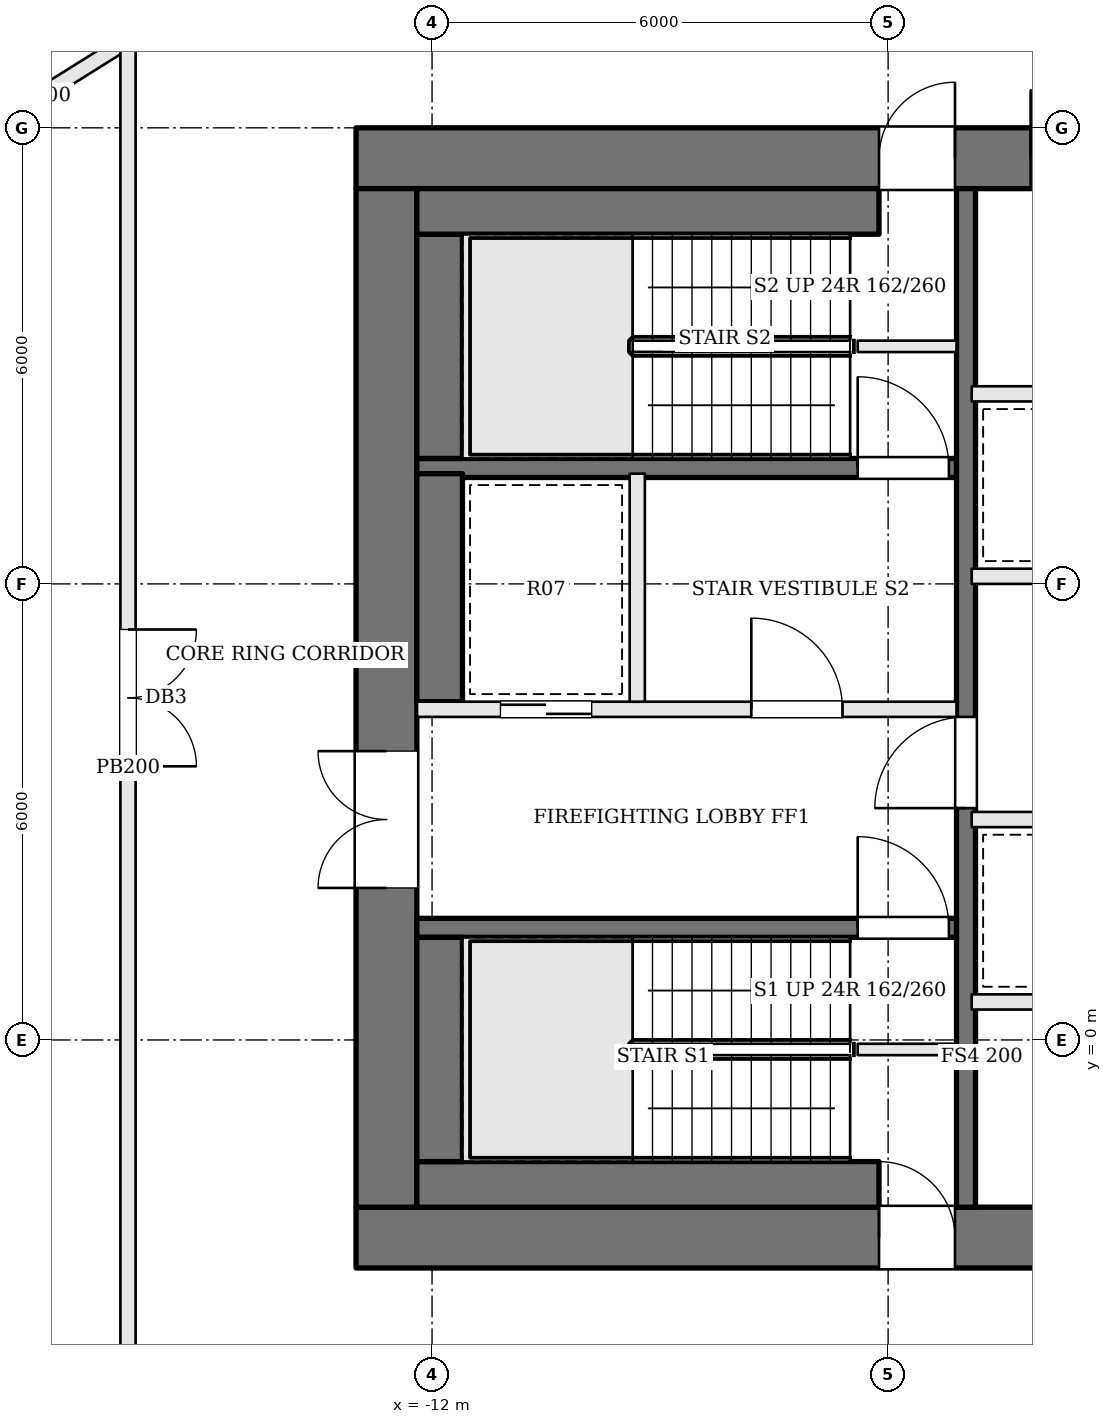
"""IFC4 building model, lengths in metres.
Left out: names, types, materials, properties, quantities, classifications, styles, units other than length and angle.
Written with IfcOpenShell. Run it as: python <this file> out.ifc"""

import sys

from ifc_helpers import new_model, si_unit, direction, frame, frame_2d, origin, place, context, subcontext, project, spatial, rectangle, extrude, element, fill, save


model = new_model("IFC4")
c1 = context("Model", 3, precision=1e-05, world=origin(), true_north=direction((0.0, 1.0)))
c2 = subcontext(c1, "Body", "Model", "MODEL_VIEW")
j1 = project(units=[si_unit("LENGTHUNIT", "METRE"), si_unit("PLANEANGLEUNIT", "RADIAN")], contexts=[c1])
p1 = place(None, origin())
s1 = spatial("IfcSite", under=j1, at=p1, CompositionType="ELEMENT")
p2 = place(p1, origin())
s2 = spatial("IfcBuilding", under=s1, at=p2, CompositionType="ELEMENT")
p3 = place(p2, frame((0.0, 0.0, 240.9)))
s3 = spatial("IfcBuildingStorey", under=s2, at=p3, CompositionType="ELEMENT", Elevation=240.9)
p4 = place(p3, frame((-13.0, 11.6, 0.0), z_axis=(0.0, 0.0, 1.0), x_axis=(1.0, 0.0, 0.0)))
e1 = element("IfcWall", 1, at=p4, inside=s3, PredefinedType="SHEAR", context=c2, shape_type="SweptSolid", body=[
    extrude(rectangle(XDim=26.0, YDim=0.8, at=frame_2d((13.0, 0.0))), origin(), (0.0, 0.0, 1.0), 3.9),
])
p5 = place(p4, frame((8.875, 0.0, 0.0)))
e2 = element("IfcOpeningElement", 2, at=p5, cuts=e1, PredefinedType="OPENING", context=c2, shape_type="SweptSolid", body=[
    extrude(rectangle(XDim=0.9, YDim=2.1, at=frame_2d((0.45, 1.05))), frame((0.0, 0.41, 0.0), z_axis=(0.0, -1.0, 0.0), x_axis=(1.0, 0.0, 0.0)), (0.0, 0.0, 1.0), 0.82),
])
p6 = place(p4, frame((11.425, 0.0, 0.0)))
e3 = element("IfcOpeningElement", 3, at=p6, cuts=e1, PredefinedType="OPENING", context=c2, shape_type="SweptSolid", body=[
    extrude(rectangle(XDim=0.7, YDim=2.1, at=frame_2d((0.35, 1.05))), frame((0.0, 0.41, 0.0), z_axis=(0.0, -1.0, 0.0), x_axis=(1.0, 0.0, 0.0)), (0.0, 0.0, 1.0), 0.82),
])
p7 = place(p4, frame((14.125, 0.0, 0.0)))
e4 = element("IfcOpeningElement", 4, at=p7, cuts=e1, PredefinedType="OPENING", context=c2, shape_type="SweptSolid", body=[
    extrude(rectangle(XDim=1.0, YDim=2.1, at=frame_2d((0.5, 1.05))), frame((0.0, 0.41, 0.0), z_axis=(0.0, -1.0, 0.0), x_axis=(1.0, 0.0, 0.0)), (0.0, 0.0, 1.0), 0.82),
])
p8 = place(p4, frame((16.725, 0.0, 0.0)))
e5 = element("IfcOpeningElement", 5, at=p8, cuts=e1, PredefinedType="OPENING", context=c2, shape_type="SweptSolid", body=[
    extrude(rectangle(XDim=0.7, YDim=2.1, at=frame_2d((0.35, 1.05))), frame((0.0, 0.41, 0.0), z_axis=(0.0, -1.0, 0.0), x_axis=(1.0, 0.0, 0.0)), (0.0, 0.0, 1.0), 0.82),
])
p9 = place(p4, frame((6.88, 0.0, 0.0)))
e6 = element("IfcOpeningElement", 6, at=p9, cuts=e1, PredefinedType="OPENING", context=c2, shape_type="SweptSolid", body=[
    extrude(rectangle(XDim=1.0, YDim=2.1, at=frame_2d((0.5, 1.05))), frame((0.0, 0.41, 0.0), z_axis=(0.0, -1.0, 0.0), x_axis=(1.0, 0.0, 0.0)), (0.0, 0.0, 1.0), 0.82),
])
p10 = place(p4, frame((18.12, 0.0, 0.0)))
e7 = element("IfcOpeningElement", 7, at=p10, cuts=e1, PredefinedType="OPENING", context=c2, shape_type="SweptSolid", body=[
    extrude(rectangle(XDim=1.0, YDim=2.1, at=frame_2d((0.5, 1.05))), frame((0.0, 0.41, 0.0), z_axis=(0.0, -1.0, 0.0), x_axis=(1.0, 0.0, 0.0)), (0.0, 0.0, 1.0), 0.82),
])
p11 = place(p3, frame((-13.0, -2.6, 0.0), z_axis=(0.0, 0.0, 1.0), x_axis=(1.0, 0.0, 0.0)))
e8 = element("IfcWall", 8, at=p11, inside=s3, PredefinedType="SHEAR", context=c2, shape_type="SweptSolid", body=[
    extrude(rectangle(XDim=26.0, YDim=0.8, at=frame_2d((13.0, 0.0))), origin(), (0.0, 0.0, 1.0), 3.9),
])
p12 = place(p11, frame((9.225, 0.0, 0.0)))
e9 = element("IfcOpeningElement", 9, at=p12, cuts=e8, PredefinedType="OPENING", context=c2, shape_type="SweptSolid", body=[
    extrude(rectangle(XDim=1.0, YDim=2.1, at=frame_2d((0.5, 1.05))), frame((0.0, 0.41, 0.0), z_axis=(0.0, -1.0, 0.0), x_axis=(1.0, 0.0, 0.0)), (0.0, 0.0, 1.0), 0.82),
])
p13 = place(p11, frame((11.825, 0.0, 0.0)))
e10 = element("IfcOpeningElement", 10, at=p13, cuts=e8, PredefinedType="OPENING", context=c2, shape_type="SweptSolid", body=[
    extrude(rectangle(XDim=0.7, YDim=2.1, at=frame_2d((0.35, 1.05))), frame((0.0, 0.41, 0.0), z_axis=(0.0, -1.0, 0.0), x_axis=(1.0, 0.0, 0.0)), (0.0, 0.0, 1.0), 0.82),
])
p14 = place(p11, frame((13.875, 0.0, 0.0)))
e11 = element("IfcOpeningElement", 11, at=p14, cuts=e8, PredefinedType="OPENING", context=c2, shape_type="SweptSolid", body=[
    extrude(rectangle(XDim=0.7, YDim=2.1, at=frame_2d((0.35, 1.05))), frame((0.0, 0.41, 0.0), z_axis=(0.0, -1.0, 0.0), x_axis=(1.0, 0.0, 0.0)), (0.0, 0.0, 1.0), 0.82),
])
p15 = place(p11, frame((16.225, 0.0, 0.0)))
e12 = element("IfcOpeningElement", 12, at=p15, cuts=e8, PredefinedType="OPENING", context=c2, shape_type="SweptSolid", body=[
    extrude(rectangle(XDim=0.9, YDim=2.1, at=frame_2d((0.45, 1.05))), frame((0.0, 0.41, 0.0), z_axis=(0.0, -1.0, 0.0), x_axis=(1.0, 0.0, 0.0)), (0.0, 0.0, 1.0), 0.82),
])
p16 = place(p11, frame((6.88, 0.0, 0.0)))
e13 = element("IfcOpeningElement", 13, at=p16, cuts=e8, PredefinedType="OPENING", context=c2, shape_type="SweptSolid", body=[
    extrude(rectangle(XDim=1.0, YDim=2.1, at=frame_2d((0.5, 1.05))), frame((0.0, 0.41, 0.0), z_axis=(0.0, -1.0, 0.0), x_axis=(1.0, 0.0, 0.0)), (0.0, 0.0, 1.0), 0.82),
])
p17 = place(p11, frame((18.12, 0.0, 0.0)))
e14 = element("IfcOpeningElement", 14, at=p17, cuts=e8, PredefinedType="OPENING", context=c2, shape_type="SweptSolid", body=[
    extrude(rectangle(XDim=1.0, YDim=2.1, at=frame_2d((0.5, 1.05))), frame((0.0, 0.41, 0.0), z_axis=(0.0, -1.0, 0.0), x_axis=(1.0, 0.0, 0.0)), (0.0, 0.0, 1.0), 0.82),
])
p18 = place(p3, frame((-12.6, -2.2, 0.0), z_axis=(0.0, 0.0, 1.0), x_axis=(0.0, 1.0, 0.0)))
e15 = element("IfcWall", 15, at=p18, inside=s3, PredefinedType="SHEAR", context=c2, shape_type="SweptSolid", body=[
    extrude(rectangle(XDim=13.4, YDim=0.8, at=frame_2d((6.7, 0.0))), origin(), (0.0, 0.0, 1.0), 3.9),
])
p19 = place(p18, frame((4.2, 0.0, 0.0)))
e16 = element("IfcOpeningElement", 16, at=p19, cuts=e15, PredefinedType="OPENING", context=c2, shape_type="SweptSolid", body=[
    extrude(rectangle(XDim=1.8, YDim=2.1, at=frame_2d((0.9, 1.05))), frame((0.0, 0.41, 0.0), z_axis=(0.0, -1.0, 0.0), x_axis=(1.0, 0.0, 0.0)), (0.0, 0.0, 1.0), 0.82),
])
for number, where, z_axis, x_axis in (
    (17, (-6.4, -0.125, 0.0), (0.0, 0.0, 1.0), (1.0, 0.0, 0.0)),
    (18, (-6.4, 9.125, 0.0), (0.0, 0.0, 1.0), (1.0, 0.0, 0.0)),
):
    element("IfcWall", number, at=place(p3, frame(where, z_axis=z_axis, x_axis=x_axis)), inside=s3, PredefinedType="SOLIDWALL", context=c2, shape_type="SweptSolid", body=[
        extrude(rectangle(XDim=1.3, YDim=0.15, at=frame_2d((0.65, 0.0))), origin(), (0.0, 0.0, 1.0), 3.7),
    ])
p20 = place(p3, frame((-12.2, 1.475, 0.0), z_axis=(0.0, 0.0, 1.0), x_axis=(1.0, 0.0, 0.0)))
e19 = element("IfcWall", 19, at=p20, inside=s3, PredefinedType="SOLIDWALL", context=c2, shape_type="SweptSolid", body=[
    extrude(rectangle(XDim=7.1, YDim=0.25, at=frame_2d((3.55, 0.0))), origin(), (0.0, 0.0, 1.0), 3.7),
])
p21 = place(p20, frame((5.8, 0.0, 0.0)))
e20 = element("IfcOpeningElement", 20, at=p21, cuts=e19, PredefinedType="OPENING", context=c2, shape_type="SweptSolid", body=[
    extrude(rectangle(XDim=1.2, YDim=2.1, at=frame_2d((0.6, 1.05))), frame((0.0, 0.135, 0.0), z_axis=(0.0, -1.0, 0.0), x_axis=(1.0, 0.0, 0.0)), (0.0, 0.0, 1.0), 0.27),
])
p22 = place(p3, frame((-12.2, 4.35, 0.0), z_axis=(0.0, 0.0, 1.0), x_axis=(1.0, 0.0, 0.0)))
e21 = element("IfcWall", 21, at=p22, inside=s3, PredefinedType="SOLIDWALL", context=c2, shape_type="SweptSolid", body=[
    extrude(rectangle(XDim=7.1, YDim=0.2, at=frame_2d((3.55, 0.0))), origin(), (0.0, 0.0, 1.0), 3.7),
])
p23 = place(p22, frame((4.4, 0.0, 0.0)))
e22 = element("IfcOpeningElement", 22, at=p23, cuts=e21, PredefinedType="OPENING", context=c2, shape_type="SweptSolid", body=[
    extrude(rectangle(XDim=1.2, YDim=2.1, at=frame_2d((0.6, 1.05))), frame((0.0, 0.11, 0.0), z_axis=(0.0, -1.0, 0.0), x_axis=(1.0, 0.0, 0.0)), (0.0, 0.0, 1.0), 0.22),
])
p24 = place(p22, frame((1.1, 0.0, 0.0)))
e23 = element("IfcOpeningElement", 23, at=p24, cuts=e21, PredefinedType="OPENING", context=c2, shape_type="SweptSolid", body=[
    extrude(rectangle(XDim=1.2, YDim=2.1, at=frame_2d((0.6, 1.05))), frame((0.0, 0.11, 0.0), z_axis=(0.0, -1.0, 0.0), x_axis=(1.0, 0.0, 0.0)), (0.0, 0.0, 1.0), 0.22),
])
p25 = place(p3, frame((-12.2, 7.525, 0.0), z_axis=(0.0, 0.0, 1.0), x_axis=(1.0, 0.0, 0.0)))
e24 = element("IfcWall", 24, at=p25, inside=s3, PredefinedType="SOLIDWALL", context=c2, shape_type="SweptSolid", body=[
    extrude(rectangle(XDim=7.1, YDim=0.25, at=frame_2d((3.55, 0.0))), origin(), (0.0, 0.0, 1.0), 3.7),
])
p26 = place(p25, frame((5.8, 0.0, 0.0)))
e25 = element("IfcOpeningElement", 25, at=p26, cuts=e24, PredefinedType="OPENING", context=c2, shape_type="SweptSolid", body=[
    extrude(rectangle(XDim=1.2, YDim=2.1, at=frame_2d((0.6, 1.05))), frame((0.0, 0.135, 0.0), z_axis=(0.0, -1.0, 0.0), x_axis=(1.0, 0.0, 0.0)), (0.0, 0.0, 1.0), 0.27),
])
p27 = place(p3, frame((-9.3, 4.45, 0.0), z_axis=(0.0, 0.0, 1.0), x_axis=(0.0, 1.0, 0.0)))
e26 = element("IfcWall", 26, at=p27, inside=s3, PredefinedType="SOLIDWALL", context=c2, shape_type="SweptSolid", body=[
    extrude(rectangle(XDim=3.0, YDim=0.2, at=frame_2d((1.5, 0.0))), origin(), (0.0, 0.0, 1.0), 3.7),
])
p28 = place(p3, frame((-4.975, -2.2, 0.0), z_axis=(0.0, 0.0, 1.0), x_axis=(0.0, 1.0, 0.0)))
e27 = element("IfcWall", 27, at=p28, inside=s3, PredefinedType="SOLIDWALL", context=c2, shape_type="SweptSolid", body=[
    extrude(rectangle(XDim=13.4, YDim=0.25, at=frame_2d((6.7, 0.0))), origin(), (0.0, 0.0, 1.0), 3.7),
])
p29 = place(p28, frame((5.25, 0.0, 0.0)))
e28 = element("IfcOpeningElement", 28, at=p29, cuts=e27, PredefinedType="OPENING", context=c2, shape_type="SweptSolid", body=[
    extrude(rectangle(XDim=1.2, YDim=2.1, at=frame_2d((0.6, 1.05))), frame((0.0, 0.135, 0.0), z_axis=(0.0, -1.0, 0.0), x_axis=(1.0, 0.0, 0.0)), (0.0, 0.0, 1.0), 0.27),
])
p30 = place(p3, frame((-12.2, -1.9, 0.0), z_axis=(0.0, 0.0, 1.0), x_axis=(1.0, 0.0, 0.0)))
e29 = element("IfcWall", 29, at=p30, inside=s3, PredefinedType="SOLIDWALL", context=c2, shape_type="SweptSolid", body=[
    extrude(rectangle(XDim=6.08, YDim=0.6, at=frame_2d((3.04, 0.0))), origin(), (0.0, 0.0, 1.0), 3.7),
])
p31 = place(p3, frame((-11.9, -1.6, 0.0), z_axis=(0.0, 0.0, 1.0), x_axis=(0.0, 1.0, 0.0)))
e30 = element("IfcWall", 30, at=p31, inside=s3, PredefinedType="SOLIDWALL", context=c2, shape_type="SweptSolid", body=[
    extrude(rectangle(XDim=2.95, YDim=0.6, at=frame_2d((1.475, 0.0))), origin(), (0.0, 0.0, 1.0), 3.7),
])
p32 = place(p3, frame((-11.9, 4.45, 0.0), z_axis=(0.0, 0.0, 1.0), x_axis=(0.0, 1.0, 0.0)))
e31 = element("IfcWall", 31, at=p32, inside=s3, PredefinedType="SOLIDWALL", context=c2, shape_type="SweptSolid", body=[
    extrude(rectangle(XDim=3.0, YDim=0.6, at=frame_2d((1.5, 0.0))), origin(), (0.0, 0.0, 1.0), 3.7),
])
p33 = place(p3, frame((-11.9, 7.65, 0.0), z_axis=(0.0, 0.0, 1.0), x_axis=(0.0, 1.0, 0.0)))
e32 = element("IfcWall", 32, at=p33, inside=s3, PredefinedType="SOLIDWALL", context=c2, shape_type="SweptSolid", body=[
    extrude(rectangle(XDim=2.95, YDim=0.6, at=frame_2d((1.475, 0.0))), origin(), (0.0, 0.0, 1.0), 3.7),
])
p34 = place(p3, frame((-12.2, 10.9, 0.0), z_axis=(0.0, 0.0, 1.0), x_axis=(1.0, 0.0, 0.0)))
e33 = element("IfcWall", 33, at=p34, inside=s3, PredefinedType="SOLIDWALL", context=c2, shape_type="SweptSolid", body=[
    extrude(rectangle(XDim=6.08, YDim=0.6, at=frame_2d((3.04, 0.0))), origin(), (0.0, 0.0, 1.0), 3.7),
])
p35 = place(p3, frame((-4.9, 0.5, 0.0), z_axis=(0.0, 0.0, 1.0), x_axis=(1.0, 0.0, 0.0)))
e34 = element("IfcWall", 34, at=p35, inside=s3, PredefinedType="SOLIDWALL", context=c2, shape_type="SweptSolid", body=[
    extrude(rectangle(XDim=9.8, YDim=0.2, at=frame_2d((4.9, 0.0))), origin(), (0.0, 0.0, 1.0), 3.7),
])
p36 = place(p3, frame((-4.9, 2.9, 0.0), z_axis=(0.0, 0.0, 1.0), x_axis=(1.0, 0.0, 0.0)))
e35 = element("IfcWall", 35, at=p36, inside=s3, PredefinedType="SOLIDWALL", context=c2, shape_type="SweptSolid", body=[
    extrude(rectangle(XDim=9.8, YDim=0.2, at=frame_2d((4.9, 0.0))), origin(), (0.0, 0.0, 1.0), 3.7),
])
p37 = place(p36, frame((2.613, 0.0, 0.0)))
e36 = element("IfcOpeningElement", 36, at=p37, cuts=e35, PredefinedType="OPENING", context=c2, shape_type="SweptSolid", body=[
    extrude(rectangle(XDim=0.9, YDim=2.1, at=frame_2d((0.45, 1.05))), frame((0.0, 0.11, 0.0), z_axis=(0.0, -1.0, 0.0), x_axis=(1.0, 0.0, 0.0)), (0.0, 0.0, 1.0), 0.22),
])
p38 = place(p36, frame((7.463, 0.0, 0.0)))
e37 = element("IfcOpeningElement", 37, at=p38, cuts=e35, PredefinedType="OPENING", context=c2, shape_type="SweptSolid", body=[
    extrude(rectangle(XDim=1.0, YDim=2.1, at=frame_2d((0.5, 1.05))), frame((0.0, 0.11, 0.0), z_axis=(0.0, -1.0, 0.0), x_axis=(1.0, 0.0, 0.0)), (0.0, 0.0, 1.0), 0.22),
])
for number, where, z_axis, x_axis in (
    (38, (-4.9, 6.1, 0.0), (0.0, 0.0, 1.0), (1.0, 0.0, 0.0)),
    (39, (-4.9, 8.5, 0.0), (0.0, 0.0, 1.0), (1.0, 0.0, 0.0)),
):
    element("IfcWall", number, at=place(p3, frame(where, z_axis=z_axis, x_axis=x_axis)), inside=s3, PredefinedType="SOLIDWALL", context=c2, shape_type="SweptSolid", body=[
        extrude(rectangle(XDim=9.8, YDim=0.2, at=frame_2d((4.9, 0.0))), origin(), (0.0, 0.0, 1.0), 3.7),
    ])
p39 = place(p3, frame((-18.422, 11.635, 0.0), z_axis=(0.0, 0.0, 1.0), x_axis=(0.848299824463, 0.529516201656, 0.0)))
e40 = element("IfcWall", 40, at=p39, inside=s3, PredefinedType="PARTITIONING", context=c2, shape_type="SweptSolid", body=[
    extrude(rectangle(XDim=2.955, YDim=0.2, at=frame_2d((1.478, 0.0))), origin(), (0.0, 0.0, 1.0), 3.7),
])
p40 = place(p3, frame((-16.0, 13.047, 0.0), z_axis=(0.0, 0.0, 1.0), x_axis=(0.0, -1.0, 0.0)))
e41 = element("IfcWall", 41, at=p40, inside=s3, PredefinedType="PARTITIONING", context=c2, shape_type="SweptSolid", body=[
    extrude(rectangle(XDim=18.947, YDim=0.2, at=frame_2d((9.474, 0.0))), origin(), (0.0, 0.0, 1.0), 3.7),
])
p41 = place(p40, frame((7.647, 0.0, 0.0)))
e42 = element("IfcOpeningElement", 42, at=p41, cuts=e41, PredefinedType="OPENING", context=c2, shape_type="SweptSolid", body=[
    extrude(rectangle(XDim=1.8, YDim=2.1, at=frame_2d((0.9, 1.05))), frame((0.0, 0.11, 0.0), z_axis=(0.0, -1.0, 0.0), x_axis=(1.0, 0.0, 0.0)), (0.0, 0.0, 1.0), 0.22),
])
p42 = place(p19, origin())
e43 = element("IfcDoor", 43, at=p42, inside=s3, OperationType="DOUBLE_DOOR_SINGLE_SWING", PredefinedType="DOOR", context=c2, shape_type="SweptSolid", body=[
    extrude(rectangle(XDim=1.8, YDim=2.1, at=frame_2d((0.9, 1.05))), frame((0.0, 0.025, 0.0), z_axis=(0.0, -1.0, 0.0), x_axis=(1.0, 0.0, 0.0)), (0.0, 0.0, 1.0), 0.05),
])
fill(e16, e43)
p43 = place(p29, origin())
e44 = element("IfcDoor", 44, at=p43, inside=s3, OperationType="SINGLE_SWING_LEFT", PredefinedType="DOOR", context=c2, shape_type="SweptSolid", body=[
    extrude(rectangle(XDim=1.2, YDim=2.1, at=frame_2d((0.6, 1.05))), frame((0.0, 0.025, 0.0), z_axis=(0.0, -1.0, 0.0), x_axis=(1.0, 0.0, 0.0)), (0.0, 0.0, 1.0), 0.05),
])
fill(e28, e44)
p44 = place(p23, origin())
e45 = element("IfcDoor", 45, at=p44, inside=s3, OperationType="SINGLE_SWING_LEFT", PredefinedType="DOOR", context=c2, shape_type="SweptSolid", body=[
    extrude(rectangle(XDim=1.2, YDim=2.1, at=frame_2d((0.6, 1.05))), frame((0.0, 0.025, 0.0), z_axis=(0.0, -1.0, 0.0), x_axis=(1.0, 0.0, 0.0)), (0.0, 0.0, 1.0), 0.05),
])
fill(e22, e45)
p45 = place(p21, origin())
e46 = element("IfcDoor", 46, at=p45, inside=s3, OperationType="SINGLE_SWING_LEFT", PredefinedType="DOOR", context=c2, shape_type="SweptSolid", body=[
    extrude(rectangle(XDim=1.2, YDim=2.1, at=frame_2d((0.6, 1.05))), frame((0.0, 0.025, 0.0), z_axis=(0.0, -1.0, 0.0), x_axis=(1.0, 0.0, 0.0)), (0.0, 0.0, 1.0), 0.05),
])
fill(e20, e46)
p46 = place(p26, origin())
e47 = element("IfcDoor", 47, at=p46, inside=s3, OperationType="SINGLE_SWING_LEFT", PredefinedType="DOOR", context=c2, shape_type="SweptSolid", body=[
    extrude(rectangle(XDim=1.2, YDim=2.1, at=frame_2d((0.6, 1.05))), frame((0.0, 0.025, 0.0), z_axis=(0.0, -1.0, 0.0), x_axis=(1.0, 0.0, 0.0)), (0.0, 0.0, 1.0), 0.05),
])
fill(e25, e47)
p47 = place(p24, origin())
e48 = element("IfcDoor", 48, at=p47, inside=s3, OperationType="SLIDING_TO_RIGHT", PredefinedType="DOOR", context=c2, shape_type="SweptSolid", body=[
    extrude(rectangle(XDim=1.2, YDim=2.1, at=frame_2d((0.6, 1.05))), frame((0.0, 0.025, 0.0), z_axis=(0.0, -1.0, 0.0), x_axis=(1.0, 0.0, 0.0)), (0.0, 0.0, 1.0), 0.05),
])
fill(e23, e48)
p48 = place(p5, origin())
e49 = element("IfcDoor", 49, at=p48, inside=s3, OperationType="SINGLE_SWING_LEFT", PredefinedType="DOOR", context=c2, shape_type="SweptSolid", body=[
    extrude(rectangle(XDim=0.9, YDim=2.1, at=frame_2d((0.45, 1.05))), frame((0.0, 0.025, 0.0), z_axis=(0.0, -1.0, 0.0), x_axis=(1.0, 0.0, 0.0)), (0.0, 0.0, 1.0), 0.05),
])
fill(e2, e49)
p49 = place(p16, origin())
e50 = element("IfcDoor", 50, at=p49, inside=s3, OperationType="SINGLE_SWING_LEFT", PredefinedType="DOOR", context=c2, shape_type="SweptSolid", body=[
    extrude(rectangle(XDim=1.0, YDim=2.1, at=frame_2d((0.5, 1.05))), frame((0.0, 0.025, 0.0), z_axis=(0.0, -1.0, 0.0), x_axis=(1.0, 0.0, 0.0)), (0.0, 0.0, 1.0), 0.05),
])
fill(e13, e50)
p50 = place(p9, origin())
e51 = element("IfcDoor", 51, at=p50, inside=s3, OperationType="SINGLE_SWING_RIGHT", PredefinedType="DOOR", context=c2, shape_type="SweptSolid", body=[
    extrude(rectangle(XDim=1.0, YDim=2.1, at=frame_2d((0.5, 1.05))), frame((0.0, 0.025, 0.0), z_axis=(0.0, -1.0, 0.0), x_axis=(1.0, 0.0, 0.0)), (0.0, 0.0, 1.0), 0.05),
])
fill(e6, e51)
p51 = place(p41, origin())
e52 = element("IfcDoor", 52, at=p51, inside=s3, OperationType="DOUBLE_DOOR_SINGLE_SWING", PredefinedType="DOOR", context=c2, shape_type="SweptSolid", body=[
    extrude(rectangle(XDim=1.8, YDim=2.1, at=frame_2d((0.9, 1.05))), frame((0.0, 0.025, 0.0), z_axis=(0.0, -1.0, 0.0), x_axis=(1.0, 0.0, 0.0)), (0.0, 0.0, 1.0), 0.05),
])
fill(e42, e52)
save(model, sys.argv[1])
